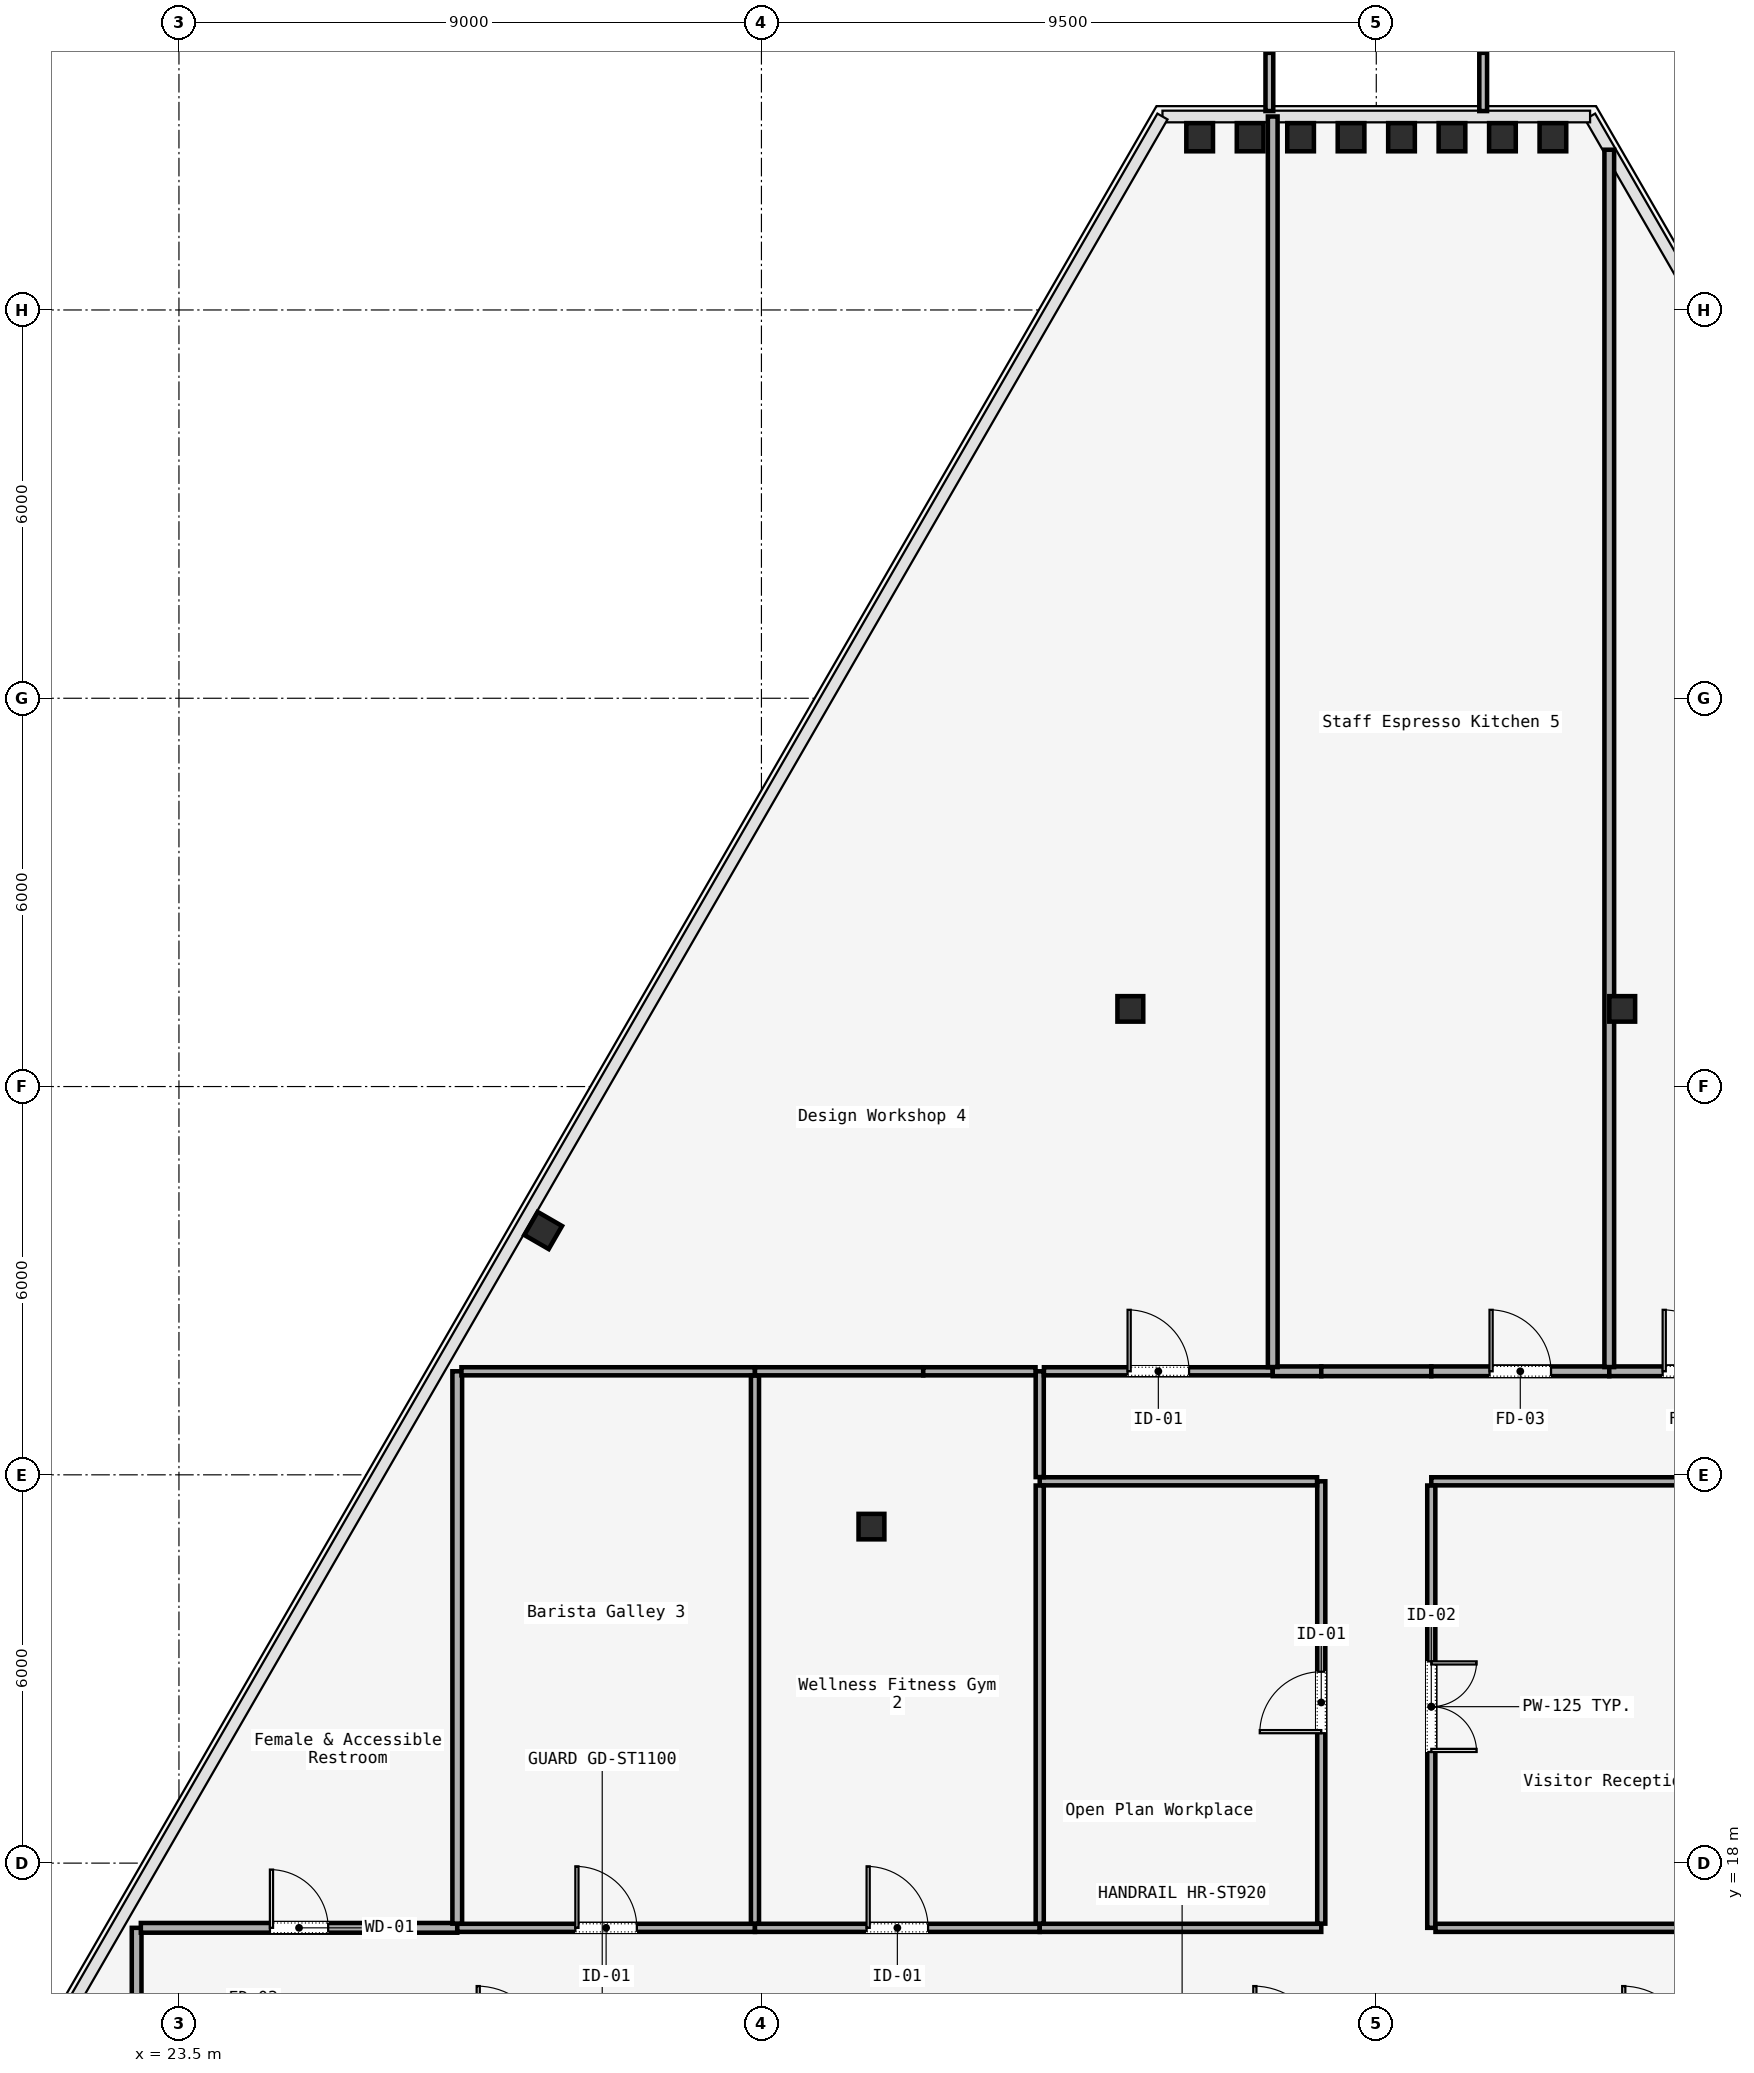
"""IFC4 building model, lengths in metres.
Left out: names, types, materials, properties, quantities, classifications, styles, units other than length and angle.
Written with IfcOpenShell. Run it as: python <this file> out.ifc"""

import sys

from ifc_helpers import new_model, si_unit, direction, frame, frame_2d, origin, origin_2d, place, context, subcontext, project, spatial, rectangle, i_section, extrude, element, fill, save


model = new_model("IFC4")
c1 = context("Model", 3, precision=1e-05, world=origin(), true_north=direction((0.0, 1.0)))
c2 = subcontext(c1, "Body", "Model", "MODEL_VIEW")
j1 = project(units=[si_unit("LENGTHUNIT", "METRE"), si_unit("PLANEANGLEUNIT", "RADIAN")], contexts=[c1])
p1 = place(None, origin())
s1 = spatial("IfcSite", under=j1, at=p1, CompositionType="ELEMENT")
p2 = place(p1, origin())
s2 = spatial("IfcBuilding", under=s1, at=p2, CompositionType="ELEMENT")
p3 = place(p2, frame((0.0, 0.0, 244.6)))
s3 = spatial("IfcBuildingStorey", under=s2, at=p3, CompositionType="ELEMENT", Elevation=244.6)
for number, where, z_axis, x_axis in (
    (1, (34.2, 23.2, 0.0), (0.0, 0.0, 1.0), (1.0, 0.0, 0.0)),
    (2, (38.2, 31.2, 0.0), (0.0, 0.0, 1.0), (1.0, 0.0, 0.0)),
    (3, (45.8, 31.2, 0.0), (0.0, 0.0, 1.0), (1.0, 0.0, 0.0)),
):
    element("IfcColumn", number, at=place(p3, frame(where, z_axis=z_axis, x_axis=x_axis)), inside=s3, PredefinedType="COLUMN", context=c2, shape_type="SweptSolid", body=[
        extrude(i_section(OverallWidth=0.399, OverallDepth=0.394, WebThickness=0.023, FlangeThickness=0.037, FilletRadius=0.015, at=origin_2d()), origin(), (0.0, 0.0, 1.0), 3.58),
    ])
for number, where, z_axis, x_axis in (
    (4, (44.729, 44.67, 0.0), (0.0, 0.0, 1.0), (1.0, 0.0, 0.0)),
    (5, (43.949, 44.67, 0.0), (0.0, 0.0, 1.0), (1.0, 0.0, 0.0)),
    (6, (43.17, 44.67, 0.0), (0.0, 0.0, 1.0), (1.0, 0.0, 0.0)),
    (7, (42.39, 44.67, 0.0), (0.0, 0.0, 1.0), (1.0, 0.0, 0.0)),
    (8, (41.61, 44.67, 0.0), (0.0, 0.0, 1.0), (1.0, 0.0, 0.0)),
    (9, (40.83, 44.67, 0.0), (0.0, 0.0, 1.0), (1.0, 0.0, 0.0)),
    (10, (40.051, 44.67, 0.0), (0.0, 0.0, 1.0), (1.0, 0.0, 0.0)),
    (11, (39.271, 44.67, 0.0), (0.0, 0.0, 1.0), (1.0, 0.0, 0.0)),
    (12, (29.127, 27.776, 0.0), (0.0, 0.0, 1.0), (0.5, 0.866, 0.0)),
):
    element("IfcColumn", number, at=place(p3, frame(where, z_axis=z_axis, x_axis=x_axis)), inside=s3, PredefinedType="COLUMN", context=c2, shape_type="SweptSolid", body=[
        extrude(i_section(OverallWidth=0.412, OverallDepth=0.435, WebThickness=0.036, FlangeThickness=0.044, FilletRadius=0.015, at=origin_2d()), origin(), (0.0, 0.0, 1.0), 3.58),
    ])
p4 = place(p3, frame((22.846, 15.215, 0.0), z_axis=(0.0, 0.0, 1.0), x_axis=(0.0, 1.0, 0.0)))
e13 = element("IfcWall", 13, at=p4, inside=s3, PredefinedType="PARTITIONING", context=c2, shape_type="SweptSolid", body=[
    extrude(rectangle(XDim=1.785, YDim=0.15, at=frame_2d((0.893, 0.0))), origin(), (0.0, 0.0, 1.0), 3.01),
])
p5 = place(p3, frame((22.911, 17.0, 0.0), z_axis=(0.0, 0.0, 1.0), x_axis=(1.0, 0.0, 0.0)))
e14 = element("IfcWall", 14, at=p5, inside=s3, PredefinedType="PARTITIONING", context=c2, shape_type="SweptSolid", body=[
    extrude(rectangle(XDim=4.889, YDim=0.15, at=frame_2d((2.445, 0.0))), origin(), (0.0, 0.0, 1.0), 3.01),
])
p6 = place(p5, frame((1.994, 0.0, 0.0)))
e15 = element("IfcOpeningElement", 15, at=p6, cuts=e14, PredefinedType="OPENING", context=c2, shape_type="SweptSolid", body=[
    extrude(rectangle(XDim=0.9, YDim=2.15, at=frame_2d((0.45, 1.075))), frame((0.0, 0.075, 0.0), z_axis=(0.0, -1.0, 0.0), x_axis=(1.0, 0.0, 0.0)), (0.0, 0.0, 1.0), 0.15),
])
p7 = place(p3, frame((27.8, 17.0, 0.0), z_axis=(0.0, 0.0, 1.0), x_axis=(1.0, 0.0, 0.0)))
e16 = element("IfcWall", 16, at=p7, inside=s3, PredefinedType="PARTITIONING", context=c2, shape_type="SweptSolid", body=[
    extrude(rectangle(XDim=4.6, YDim=0.125, at=frame_2d((2.3, 0.0))), origin(), (0.0, 0.0, 1.0), 3.01),
])
p8 = place(p7, frame((1.825, 0.0, 0.0)))
e17 = element("IfcOpeningElement", 17, at=p8, cuts=e16, PredefinedType="OPENING", context=c2, shape_type="SweptSolid", body=[
    extrude(rectangle(XDim=0.95, YDim=2.2, at=frame_2d((0.475, 1.1))), frame((0.0, 0.062, 0.0), z_axis=(0.0, -1.0, 0.0), x_axis=(1.0, 0.0, 0.0)), (0.0, 0.0, 1.0), 0.125),
])
p9 = place(p3, frame((32.4, 17.0, 0.0), z_axis=(0.0, 0.0, 1.0), x_axis=(1.0, 0.0, 0.0)))
e18 = element("IfcWall", 18, at=p9, inside=s3, PredefinedType="PARTITIONING", context=c2, shape_type="SweptSolid", body=[
    extrude(rectangle(XDim=4.4, YDim=0.125, at=frame_2d((2.2, 0.0))), origin(), (0.0, 0.0, 1.0), 3.01),
])
p10 = place(p9, frame((1.725, 0.0, 0.0)))
e19 = element("IfcOpeningElement", 19, at=p10, cuts=e18, PredefinedType="OPENING", context=c2, shape_type="SweptSolid", body=[
    extrude(rectangle(XDim=0.95, YDim=2.2, at=frame_2d((0.475, 1.1))), frame((0.0, 0.062, 0.0), z_axis=(0.0, -1.0, 0.0), x_axis=(1.0, 0.0, 0.0)), (0.0, 0.0, 1.0), 0.125),
])
p11 = place(p3, frame((36.8, 17.0, 0.0), z_axis=(0.0, 0.0, 1.0), x_axis=(1.0, 0.0, 0.0)))
e20 = element("IfcWall", 20, at=p11, inside=s3, PredefinedType="PARTITIONING", context=c2, shape_type="SweptSolid", body=[
    extrude(rectangle(XDim=4.35, YDim=0.125, at=frame_2d((2.175, 0.0))), origin(), (0.0, 0.0, 1.0), 3.01),
])
p12 = place(p3, frame((41.15, 17.065, 0.0), z_axis=(0.0, 0.0, 1.0), x_axis=(0.0, 1.0, 0.0)))
e21 = element("IfcWall", 21, at=p12, inside=s3, PredefinedType="PARTITIONING", context=c2, shape_type="SweptSolid", body=[
    extrude(rectangle(XDim=6.835, YDim=0.125, at=frame_2d((3.417, 0.0))), origin(), (0.0, 0.0, 1.0), 3.01),
])
p13 = place(p12, frame((2.942, 0.0, 0.0)))
e22 = element("IfcOpeningElement", 22, at=p13, cuts=e21, PredefinedType="OPENING", context=c2, shape_type="SweptSolid", body=[
    extrude(rectangle(XDim=0.95, YDim=2.2, at=frame_2d((0.475, 1.1))), frame((0.0, 0.062, 0.0), z_axis=(0.0, -1.0, 0.0), x_axis=(1.0, 0.0, 0.0)), (0.0, 0.0, 1.0), 0.125),
])
p14 = place(p3, frame((41.085, 23.9, 0.0), z_axis=(0.0, 0.0, 1.0), x_axis=(-1.0, 0.0, 0.0)))
e23 = element("IfcWall", 23, at=p14, inside=s3, PredefinedType="PARTITIONING", context=c2, shape_type="SweptSolid", body=[
    extrude(rectangle(XDim=4.285, YDim=0.125, at=frame_2d((2.143, 0.0))), origin(), (0.0, 0.0, 1.0), 3.01),
])
p15 = place(p3, frame((36.8, 23.965, 0.0), z_axis=(0.0, 0.0, 1.0), x_axis=(0.0, 1.0, 0.0)))
e24 = element("IfcWall", 24, at=p15, inside=s3, PredefinedType="PARTITIONING", context=c2, shape_type="SweptSolid", body=[
    extrude(rectangle(XDim=1.635, YDim=0.125, at=frame_2d((0.817, 0.0))), origin(), (0.0, 0.0, 1.0), 3.01),
])
p16 = place(p3, frame((36.865, 25.6, 0.0), z_axis=(0.0, 0.0, 1.0), x_axis=(1.0, 0.0, 0.0)))
e25 = element("IfcWall", 25, at=p16, inside=s3, PredefinedType="PARTITIONING", context=c2, shape_type="SweptSolid", body=[
    extrude(rectangle(XDim=3.535, YDim=0.125, at=frame_2d((1.768, 0.0))), origin(), (0.0, 0.0, 1.0), 3.01),
])
p17 = place(p16, frame((1.292, 0.0, 0.0)))
e26 = element("IfcOpeningElement", 26, at=p17, cuts=e25, PredefinedType="OPENING", context=c2, shape_type="SweptSolid", body=[
    extrude(rectangle(XDim=0.95, YDim=2.2, at=frame_2d((0.475, 1.1))), frame((0.0, 0.062, 0.0), z_axis=(0.0, -1.0, 0.0), x_axis=(1.0, 0.0, 0.0)), (0.0, 0.0, 1.0), 0.125),
])
p18 = place(p3, frame((40.4, 25.6, 0.0), z_axis=(0.0, 0.0, 1.0), x_axis=(1.0, 0.0, 0.0)))
e27 = element("IfcWall", 27, at=p18, inside=s3, PredefinedType="PARTITIONING", context=c2, shape_type="SweptSolid", body=[
    extrude(rectangle(XDim=0.75, YDim=0.15, at=frame_2d((0.375, 0.0))), origin(), (0.0, 0.0, 1.0), 3.01),
])
p19 = place(p3, frame((41.15, 25.6, 0.0), z_axis=(0.0, 0.0, 1.0), x_axis=(1.0, 0.0, 0.0)))
e28 = element("IfcWall", 28, at=p19, inside=s3, PredefinedType="PARTITIONING", context=c2, shape_type="SweptSolid", body=[
    extrude(rectangle(XDim=1.7, YDim=0.15, at=frame_2d((0.85, 0.0))), origin(), (0.0, 0.0, 1.0), 3.01),
])
p20 = place(p3, frame((42.85, 25.6, 0.0), z_axis=(0.0, 0.0, 1.0), x_axis=(1.0, 0.0, 0.0)))
e29 = element("IfcWall", 29, at=p20, inside=s3, PredefinedType="PARTITIONING", context=c2, shape_type="SweptSolid", body=[
    extrude(rectangle(XDim=2.75, YDim=0.15, at=frame_2d((1.375, 0.0))), origin(), (0.0, 0.0, 1.0), 3.01),
])
p21 = place(p20, frame((0.9, 0.0, 0.0)))
e30 = element("IfcOpeningElement", 30, at=p21, cuts=e29, PredefinedType="OPENING", context=c2, shape_type="SweptSolid", body=[
    extrude(rectangle(XDim=0.95, YDim=2.2, at=frame_2d((0.475, 1.1))), frame((0.0, 0.075, 0.0), z_axis=(0.0, -1.0, 0.0), x_axis=(1.0, 0.0, 0.0)), (0.0, 0.0, 1.0), 0.15),
])
p22 = place(p3, frame((45.6, 25.6, 0.0), z_axis=(0.0, 0.0, 1.0), x_axis=(1.0, 0.0, 0.0)))
e31 = element("IfcWall", 31, at=p22, inside=s3, PredefinedType="PARTITIONING", context=c2, shape_type="SweptSolid", body=[
    extrude(rectangle(XDim=2.6, YDim=0.15, at=frame_2d((1.3, 0.0))), origin(), (0.0, 0.0, 1.0), 3.01),
])
p23 = place(p22, frame((0.825, 0.0, 0.0)))
e32 = element("IfcOpeningElement", 32, at=p23, cuts=e31, PredefinedType="OPENING", context=c2, shape_type="SweptSolid", body=[
    extrude(rectangle(XDim=0.95, YDim=2.2, at=frame_2d((0.475, 1.1))), frame((0.0, 0.075, 0.0), z_axis=(0.0, -1.0, 0.0), x_axis=(1.0, 0.0, 0.0)), (0.0, 0.0, 1.0), 0.15),
])
p24 = place(p3, frame((48.135, 23.9, 0.0), z_axis=(0.0, 0.0, 1.0), x_axis=(-1.0, 0.0, 0.0)))
e33 = element("IfcWall", 33, at=p24, inside=s3, PredefinedType="PARTITIONING", context=c2, shape_type="SweptSolid", body=[
    extrude(rectangle(XDim=5.285, YDim=0.125, at=frame_2d((2.643, 0.0))), origin(), (0.0, 0.0, 1.0), 3.01),
])
p25 = place(p3, frame((42.85, 23.835, 0.0), z_axis=(0.0, 0.0, 1.0), x_axis=(0.0, -1.0, 0.0)))
e34 = element("IfcWall", 34, at=p25, inside=s3, PredefinedType="PARTITIONING", context=c2, shape_type="SweptSolid", body=[
    extrude(rectangle(XDim=6.835, YDim=0.125, at=frame_2d((3.417, 0.0))), origin(), (0.0, 0.0, 1.0), 3.01),
])
p26 = place(p25, frame((2.718, 0.0, 0.0)))
e35 = element("IfcOpeningElement", 35, at=p26, cuts=e34, PredefinedType="OPENING", context=c2, shape_type="SweptSolid", body=[
    extrude(rectangle(XDim=1.4, YDim=2.2, at=frame_2d((0.7, 1.1))), frame((0.0, 0.062, 0.0), z_axis=(0.0, -1.0, 0.0), x_axis=(1.0, 0.0, 0.0)), (0.0, 0.0, 1.0), 0.125),
])
p27 = place(p3, frame((42.915, 17.0, 0.0), z_axis=(0.0, 0.0, 1.0), x_axis=(1.0, 0.0, 0.0)))
e36 = element("IfcWall", 36, at=p27, inside=s3, PredefinedType="PARTITIONING", context=c2, shape_type="SweptSolid", body=[
    extrude(rectangle(XDim=5.285, YDim=0.125, at=frame_2d((2.643, 0.0))), origin(), (0.0, 0.0, 1.0), 3.01),
])
p28 = place(p3, frame((27.8, 25.6, 0.0), z_axis=(0.0, 0.0, 1.0), x_axis=(0.0, -1.0, 0.0)))
e37 = element("IfcWall", 37, at=p28, inside=s3, PredefinedType="PARTITIONING", context=c2, shape_type="SweptSolid", body=[
    extrude(rectangle(XDim=8.535, YDim=0.15, at=frame_2d((4.268, 0.0))), origin(), (0.0, 0.0, 1.0), 3.01),
])
p29 = place(p3, frame((36.8, 17.065, 0.0), z_axis=(0.0, 0.0, 1.0), x_axis=(0.0, 1.0, 0.0)))
e38 = element("IfcWall", 38, at=p29, inside=s3, PredefinedType="PARTITIONING", context=c2, shape_type="SweptSolid", body=[
    extrude(rectangle(XDim=6.77, YDim=0.125, at=frame_2d((3.385, 0.0))), origin(), (0.0, 0.0, 1.0), 3.01),
])
p30 = place(p3, frame((27.865, 25.6, 0.0), z_axis=(0.0, 0.0, 1.0), x_axis=(1.0, 0.0, 0.0)))
e39 = element("IfcWall", 39, at=p30, inside=s3, PredefinedType="PARTITIONING", context=c2, shape_type="SweptSolid", body=[
    extrude(rectangle(XDim=4.535, YDim=0.125, at=frame_2d((2.268, 0.0))), origin(), (0.0, 0.0, 1.0), 3.01),
])
p31 = place(p3, frame((32.4, 25.535, 0.0), z_axis=(0.0, 0.0, 1.0), x_axis=(0.0, -1.0, 0.0)))
e40 = element("IfcWall", 40, at=p31, inside=s3, PredefinedType="PARTITIONING", context=c2, shape_type="SweptSolid", body=[
    extrude(rectangle(XDim=8.47, YDim=0.125, at=frame_2d((4.235, 0.0))), origin(), (0.0, 0.0, 1.0), 3.01),
])
p32 = place(p3, frame((32.4, 25.6, 0.0), z_axis=(0.0, 0.0, 1.0), x_axis=(1.0, 0.0, 0.0)))
e41 = element("IfcWall", 41, at=p32, inside=s3, PredefinedType="PARTITIONING", context=c2, shape_type="SweptSolid", body=[
    extrude(rectangle(XDim=2.6, YDim=0.125, at=frame_2d((1.3, 0.0))), origin(), (0.0, 0.0, 1.0), 3.01),
])
p33 = place(p3, frame((35.0, 25.6, 0.0), z_axis=(0.0, 0.0, 1.0), x_axis=(1.0, 0.0, 0.0)))
e42 = element("IfcWall", 42, at=p33, inside=s3, PredefinedType="PARTITIONING", context=c2, shape_type="SweptSolid", body=[
    extrude(rectangle(XDim=1.735, YDim=0.125, at=frame_2d((0.868, 0.0))), origin(), (0.0, 0.0, 1.0), 3.01),
])
p34 = place(p3, frame((45.6, 25.665, 0.0), z_axis=(0.0, 0.0, 1.0), x_axis=(0.0, 1.0, 0.0)))
e43 = element("IfcWall", 43, at=p34, inside=s3, PredefinedType="PARTITIONING", context=c2, shape_type="SweptSolid", body=[
    extrude(rectangle(XDim=18.811, YDim=0.15, at=frame_2d((9.406, 0.0))), origin(), (0.0, 0.0, 1.0), 3.01),
])
p35 = place(p3, frame((40.4, 44.99, 0.0), z_axis=(0.0, 0.0, 1.0), x_axis=(0.0, -1.0, 0.0)))
e44 = element("IfcWall", 44, at=p35, inside=s3, PredefinedType="PARTITIONING", context=c2, shape_type="SweptSolid", body=[
    extrude(rectangle(XDim=19.324, YDim=0.15, at=frame_2d((9.662, 0.0))), origin(), (0.0, 0.0, 1.0), 3.01),
])
p36 = place(p6, origin())
e45 = element("IfcDoor", 45, at=p36, inside=s3, OperationType="SINGLE_SWING_LEFT", PredefinedType="DOOR", context=c2, shape_type="SweptSolid", body=[
    extrude(rectangle(XDim=0.9, YDim=2.15, at=frame_2d((0.45, 1.075))), frame((0.0, 0.025, 0.0), z_axis=(0.0, -1.0, 0.0), x_axis=(1.0, 0.0, 0.0)), (0.0, 0.0, 1.0), 0.05),
])
fill(e15, e45)
p37 = place(p13, origin())
e46 = element("IfcDoor", 46, at=p37, inside=s3, OperationType="SINGLE_SWING_RIGHT", PredefinedType="DOOR", context=c2, shape_type="SweptSolid", body=[
    extrude(rectangle(XDim=0.95, YDim=2.2, at=frame_2d((0.475, 1.1))), frame((0.0, 0.025, 0.0), z_axis=(0.0, -1.0, 0.0), x_axis=(1.0, 0.0, 0.0)), (0.0, 0.0, 1.0), 0.05),
])
fill(e22, e46)
p38 = place(p26, origin())
e47 = element("IfcDoor", 47, at=p38, inside=s3, OperationType="SINGLE_SWING_LEFT", PredefinedType="DOOR", context=c2, shape_type="SweptSolid", body=[
    extrude(rectangle(XDim=1.4, YDim=2.2, at=frame_2d((0.7, 1.1))), frame((0.0, 0.025, 0.0), z_axis=(0.0, -1.0, 0.0), x_axis=(1.0, 0.0, 0.0)), (0.0, 0.0, 1.0), 0.05),
])
fill(e35, e47)
p39 = place(p8, origin())
e48 = element("IfcDoor", 48, at=p39, inside=s3, OperationType="SINGLE_SWING_LEFT", PredefinedType="DOOR", context=c2, shape_type="SweptSolid", body=[
    extrude(rectangle(XDim=0.95, YDim=2.2, at=frame_2d((0.475, 1.1))), frame((0.0, 0.025, 0.0), z_axis=(0.0, -1.0, 0.0), x_axis=(1.0, 0.0, 0.0)), (0.0, 0.0, 1.0), 0.05),
])
fill(e17, e48)
p40 = place(p10, origin())
e49 = element("IfcDoor", 49, at=p40, inside=s3, OperationType="SINGLE_SWING_RIGHT", PredefinedType="DOOR", context=c2, shape_type="SweptSolid", body=[
    extrude(rectangle(XDim=0.95, YDim=2.2, at=frame_2d((0.475, 1.1))), frame((0.0, 0.025, 0.0), z_axis=(0.0, -1.0, 0.0), x_axis=(1.0, 0.0, 0.0)), (0.0, 0.0, 1.0), 0.05),
])
fill(e19, e49)
p41 = place(p23, origin())
e50 = element("IfcDoor", 50, at=p41, inside=s3, OperationType="SINGLE_SWING_RIGHT", PredefinedType="DOOR", context=c2, shape_type="SweptSolid", body=[
    extrude(rectangle(XDim=0.95, YDim=2.2, at=frame_2d((0.475, 1.1))), frame((0.0, 0.025, 0.0), z_axis=(0.0, -1.0, 0.0), x_axis=(1.0, 0.0, 0.0)), (0.0, 0.0, 1.0), 0.05),
])
fill(e32, e50)
p42 = place(p17, origin())
e51 = element("IfcDoor", 51, at=p42, inside=s3, OperationType="SINGLE_SWING_LEFT", PredefinedType="DOOR", context=c2, shape_type="SweptSolid", body=[
    extrude(rectangle(XDim=0.95, YDim=2.2, at=frame_2d((0.475, 1.1))), frame((0.0, 0.025, 0.0), z_axis=(0.0, -1.0, 0.0), x_axis=(1.0, 0.0, 0.0)), (0.0, 0.0, 1.0), 0.05),
])
fill(e26, e51)
p43 = place(p21, origin())
e52 = element("IfcDoor", 52, at=p43, inside=s3, OperationType="SINGLE_SWING_RIGHT", PredefinedType="DOOR", context=c2, shape_type="SweptSolid", body=[
    extrude(rectangle(XDim=0.95, YDim=2.2, at=frame_2d((0.475, 1.1))), frame((0.0, 0.025, 0.0), z_axis=(0.0, -1.0, 0.0), x_axis=(1.0, 0.0, 0.0)), (0.0, 0.0, 1.0), 0.05),
])
fill(e30, e52)
save(model, sys.argv[1])
